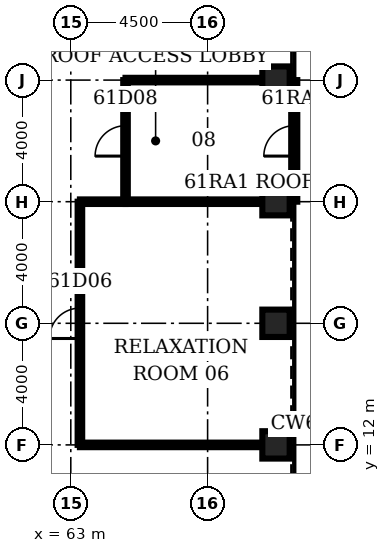
"""IFC4 building model, lengths in metres.
Left out: names, types, materials, properties, quantities, classifications, styles, units other than length and angle.
Written with IfcOpenShell. Run it as: python <this file> out.ifc"""

import sys

from ifc_helpers import new_model, si_unit, direction, frame, frame_2d, origin, origin_2d, place, context, subcontext, project, spatial, rectangle, hollow_rectangle, extrude, element, fill, save


model = new_model("IFC4")
c1 = context("Model", 3, precision=1e-05, world=origin(), true_north=direction((0.0, 1.0)))
c2 = subcontext(c1, "Body", "Model", "MODEL_VIEW")
j1 = project(units=[si_unit("LENGTHUNIT", "METRE"), si_unit("PLANEANGLEUNIT", "RADIAN")], contexts=[c1])
p1 = place(None, origin())
s1 = spatial("IfcSite", under=j1, at=p1, CompositionType="ELEMENT")
p2 = place(p1, origin())
s2 = spatial("IfcBuilding", under=s1, at=p2, CompositionType="ELEMENT")
p3 = place(p2, frame((0.0, 0.0, 271.1)))
s3 = spatial("IfcBuildingStorey", under=s2, at=p3, CompositionType="ELEMENT", Elevation=271.1)
for number, where, z_axis, x_axis in (
    (1, (69.75, 12.0, 0.0), (0.0, 0.0, 1.0), (1.0, 0.0, 0.0)),
    (2, (69.75, 16.0, 0.0), (0.0, 0.0, 1.0), (1.0, 0.0, 0.0)),
    (3, (69.75, 20.0, 0.0), (0.0, 0.0, 1.0), (1.0, 0.0, 0.0)),
    (4, (69.75, 24.0, 0.0), (0.0, 0.0, 1.0), (1.0, 0.0, 0.0)),
):
    element("IfcColumn", number, at=place(p3, frame(where, z_axis=z_axis, x_axis=x_axis)), inside=s3, PredefinedType="COLUMN", context=c2, shape_type="SweptSolid", body=[
        extrude(hollow_rectangle(XDim=0.9, YDim=0.9, WallThickness=0.07, at=origin_2d()), origin(), (0.0, 0.0, 1.0), 4.2),
    ])
p4 = place(p3, frame((63.3, 12.0, 0.0), z_axis=(0.0, 0.0, 1.0), x_axis=(1.0, 0.0, 0.0)))
e5 = element("IfcWall", 5, at=p4, inside=s3, PredefinedType="PARTITIONING", context=c2, shape_type="SweptSolid", body=[
    extrude(rectangle(XDim=6.0, YDim=0.15, at=frame_2d((3.0, 0.0))), origin(), (0.0, 0.0, 1.0), 3.0),
])
p5 = place(p3, frame((63.3, 20.0, 0.0), z_axis=(0.0, 0.0, 1.0), x_axis=(1.0, 0.0, 0.0)))
e6 = element("IfcWall", 6, at=p5, inside=s3, PredefinedType="PARTITIONING", context=c2, shape_type="SweptSolid", body=[
    extrude(rectangle(XDim=1.5, YDim=0.15, at=frame_2d((0.75, 0.0))), origin(), (0.0, 0.0, 1.0), 3.0),
])
for number, where, z_axis, x_axis in (
    (7, (64.8, 20.0, 0.0), (0.0, 0.0, 1.0), (1.0, 0.0, 0.0)),
    (8, (64.8, 24.0, 0.0), (0.0, 0.0, 1.0), (1.0, 0.0, 0.0)),
):
    element("IfcWall", number, at=place(p3, frame(where, z_axis=z_axis, x_axis=x_axis)), inside=s3, PredefinedType="PARTITIONING", context=c2, shape_type="SweptSolid", body=[
        extrude(rectangle(XDim=4.5, YDim=0.15, at=frame_2d((2.25, 0.0))), origin(), (0.0, 0.0, 1.0), 3.0),
    ])
p6 = place(p3, frame((63.3, 12.0, 0.0), z_axis=(0.0, 0.0, 1.0), x_axis=(0.0, 1.0, 0.0)))
e9 = element("IfcWall", 9, at=p6, inside=s3, PredefinedType="PARTITIONING", context=c2, shape_type="SweptSolid", body=[
    extrude(rectangle(XDim=8.0, YDim=0.15, at=frame_2d((4.0, 0.0))), origin(), (0.0, 0.0, 1.0), 3.0),
])
p7 = place(p6, frame((3.5, 0.0, 0.0)))
e10 = element("IfcOpeningElement", 10, at=p7, cuts=e9, PredefinedType="OPENING", context=c2, shape_type="SweptSolid", body=[
    extrude(rectangle(XDim=1.0, YDim=2.1, at=frame_2d((0.5, 1.05))), frame((0.0, 0.085, 0.0), z_axis=(0.0, -1.0, 0.0), x_axis=(1.0, 0.0, 0.0)), (0.0, 0.0, 1.0), 0.17),
])
p8 = place(p3, frame((64.8, 20.0, 0.0), z_axis=(0.0, 0.0, 1.0), x_axis=(0.0, 1.0, 0.0)))
e11 = element("IfcWall", 11, at=p8, inside=s3, PredefinedType="PARTITIONING", context=c2, shape_type="SweptSolid", body=[
    extrude(rectangle(XDim=4.0, YDim=0.15, at=frame_2d((2.0, 0.0))), origin(), (0.0, 0.0, 1.0), 3.0),
])
p9 = place(p8, frame((1.5, 0.0, 0.0)))
e12 = element("IfcOpeningElement", 12, at=p9, cuts=e11, PredefinedType="OPENING", context=c2, shape_type="SweptSolid", body=[
    extrude(rectangle(XDim=1.0, YDim=2.1, at=frame_2d((0.5, 1.05))), frame((0.0, 0.085, 0.0), z_axis=(0.0, -1.0, 0.0), x_axis=(1.0, 0.0, 0.0)), (0.0, 0.0, 1.0), 0.17),
])
p10 = place(p3, frame((70.35, 20.0, 0.0), z_axis=(0.0, 0.0, 1.0), x_axis=(0.0, 1.0, 0.0)))
e13 = element("IfcWall", 13, at=p10, inside=s3, PredefinedType="SOLIDWALL", context=c2, shape_type="SweptSolid", body=[
    extrude(rectangle(XDim=4.0, YDim=0.2, at=frame_2d((2.0, 0.0))), origin(), (0.0, 0.0, 1.0), 4.04),
])
p11 = place(p10, frame((1.5, 0.0, 0.0)))
e14 = element("IfcOpeningElement", 14, at=p11, cuts=e13, PredefinedType="OPENING", context=c2, shape_type="SweptSolid", body=[
    extrude(rectangle(XDim=1.0, YDim=2.1, at=frame_2d((0.5, 1.05))), frame((0.0, 0.11, 0.0), z_axis=(0.0, -1.0, 0.0), x_axis=(1.0, 0.0, 0.0)), (0.0, 0.0, 1.0), 0.22),
])
p12 = place(p7, origin())
e15 = element("IfcDoor", 15, at=p12, inside=s3, OperationType="SINGLE_SWING_LEFT", PredefinedType="DOOR", context=c2, shape_type="SweptSolid", body=[
    extrude(rectangle(XDim=1.0, YDim=2.1, at=frame_2d((0.5, 1.05))), frame((0.0, 0.025, 0.0), z_axis=(0.0, -1.0, 0.0), x_axis=(1.0, 0.0, 0.0)), (0.0, 0.0, 1.0), 0.05),
])
fill(e10, e15)
p13 = place(p9, origin())
e16 = element("IfcDoor", 16, at=p13, inside=s3, OperationType="SINGLE_SWING_LEFT", PredefinedType="DOOR", context=c2, shape_type="SweptSolid", body=[
    extrude(rectangle(XDim=1.0, YDim=2.1, at=frame_2d((0.5, 1.05))), frame((0.0, 0.025, 0.0), z_axis=(0.0, -1.0, 0.0), x_axis=(1.0, 0.0, 0.0)), (0.0, 0.0, 1.0), 0.05),
])
fill(e12, e16)
p14 = place(p11, origin())
e17 = element("IfcDoor", 17, at=p14, inside=s3, OperationType="SINGLE_SWING_LEFT", PredefinedType="DOOR", context=c2, shape_type="SweptSolid", body=[
    extrude(rectangle(XDim=1.0, YDim=2.1, at=frame_2d((0.5, 1.05))), frame((0.0, 0.025, 0.0), z_axis=(0.0, -1.0, 0.0), x_axis=(1.0, 0.0, 0.0)), (0.0, 0.0, 1.0), 0.05),
])
fill(e14, e17)
save(model, sys.argv[1])
